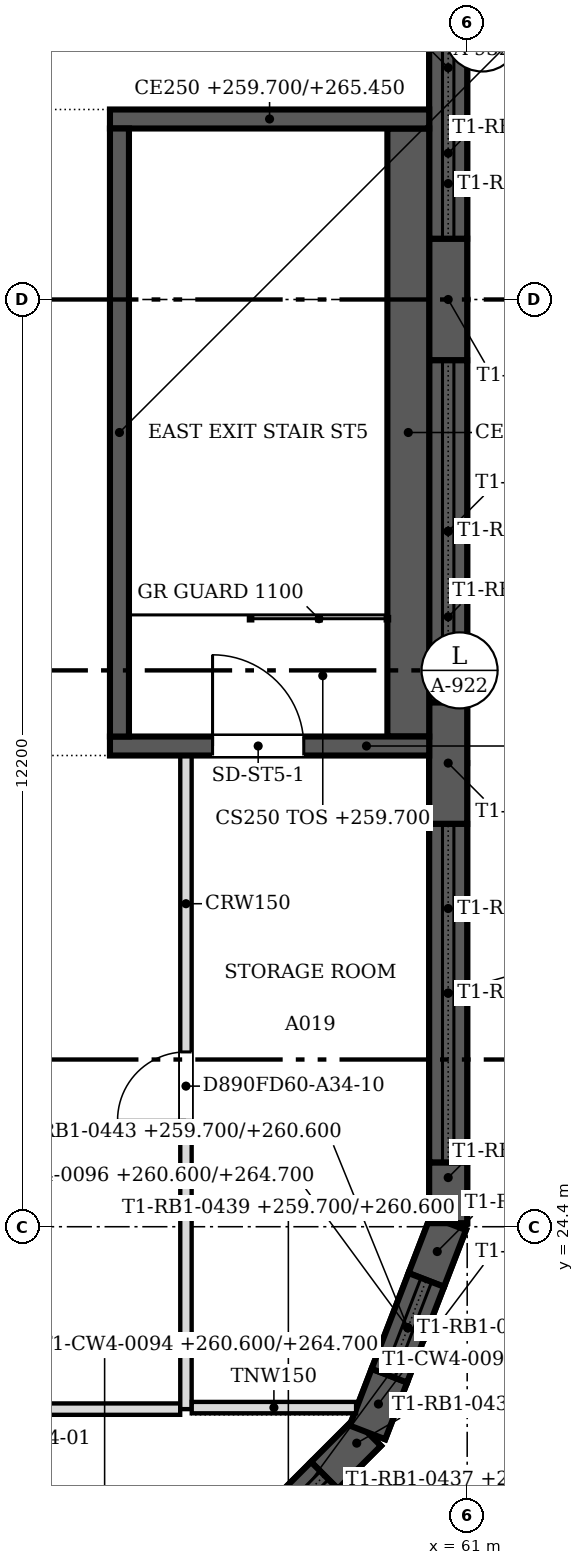
"""IFC4 building model, lengths in metres.
Left out: names, types, materials, properties, quantities, classifications, styles, units other than length and angle.
Written with IfcOpenShell. Run it as: python <this file> out.ifc"""

import sys

from ifc_helpers import new_model, si_unit, direction, frame, frame_2d, origin, place, context, subcontext, project, spatial, polyline, rectangle, outline, extrude, faceted_brep, source, transform, mapped, element, fill, save


model = new_model("IFC4")
c1 = context("Model", 3, precision=1e-05, world=origin(), true_north=direction((0.0, 1.0)))
c2 = subcontext(c1, "Body", "Model", "MODEL_VIEW")
j1 = project(units=[si_unit("LENGTHUNIT", "METRE"), si_unit("PLANEANGLEUNIT", "RADIAN")], contexts=[c1])
p1 = place(None, origin())
s1 = spatial("IfcSite", under=j1, at=p1, CompositionType="ELEMENT")
p2 = place(p1, origin())
s2 = spatial("IfcBuilding", under=s1, at=p2, CompositionType="ELEMENT")
p3 = place(p2, frame((0.0, 0.0, 259.7)))
s3 = spatial("IfcBuildingStorey", under=s2, at=p3, CompositionType="ELEMENT", Elevation=259.7)
m1 = source(origin(), c2, "Body", "Brep", [
    faceted_brep([(0.0, -0.25, 0.0), (0.8, -0.25, 0.0), (0.8, -0.25, 5.0), (0.0, -0.25, 5.0), (0.0, 0.25, 5.0), (0.747, 0.25, 5.0), (0.747, 0.25, 0.0), (0.0, 0.25, 0.0), (0.8, -0.0, 0.0), (0.8, -0.0, 5.0)], [[[0, 1, 2, 3]], [[4, 5, 6, 7]], [[7, 6, 8, 1, 0]], [[9, 2, 1, 8]], [[5, 4, 3, 2, 9]], [[4, 7, 0, 3]], [[8, 6, 5, 9]]]),
])
p4 = place(p3, frame((59.122, 21.128, 0.0), z_axis=(0.0, 0.0, 1.0), x_axis=(0.707106781187, 0.707106781187, 0.0)))
e1 = element("IfcWall", 1, at=p4, inside=s3, PredefinedType="SOLIDWALL", context=c2, shape_type="MappedRepresentation", body=[
    mapped(m1, transform((0.0, 0.0, 0.0), scale=1.0)),
])
m2 = source(origin(), c2, "Body", "SweptSolid", [
    extrude(outline(polyline([(0.0, 0.0), (1.344, 0.0), (1.344, 0.9), (0.0, 0.9), (0.0, 0.0)])), frame((0.0, 0.25, 0.0), z_axis=(0.0, -1.0, 0.0), x_axis=(1.0, 0.0, 0.0)), (0.0, 0.0, 1.0), 0.5),
])
p5 = place(p3, frame((58.172, 20.177, 0.0), z_axis=(0.0, 0.0, 1.0), x_axis=(0.707106781187, 0.707106781187, 0.0)))
e2 = element("IfcWall", 2, at=p5, inside=s3, PredefinedType="SOLIDWALL", context=c2, shape_type="MappedRepresentation", body=[
    mapped(m2, transform((0.0, 0.0, 0.0), scale=1.0)),
])
m3 = source(origin(), c2, "Body", "Brep", [
    faceted_brep([(0.0, -0.25, 0.0), (2.944, -0.25, 0.0), (2.944, -0.25, 1.0), (0.0, -0.25, 1.0), (0.053, 0.25, 1.0), (2.891, 0.25, 1.0), (2.891, 0.25, 0.0), (0.053, 0.25, 0.0), (2.944, 0.0, 0.0), (0.0, 0.0, 0.0), (2.944, 0.0, 1.0), (0.0, 0.0, 1.0)], [[[0, 1, 2, 3]], [[4, 5, 6, 7]], [[7, 6, 8, 1, 0, 9]], [[10, 2, 1, 8]], [[5, 4, 11, 3, 2, 10]], [[9, 0, 3, 11]], [[7, 9, 11, 4]], [[8, 6, 5, 10]]]),
])
p6 = place(p3, frame((57.606, 19.612, 5.0), z_axis=(0.0, 0.0, 1.0), x_axis=(0.707106781187, 0.707106781187, 0.0)))
e3 = element("IfcWall", 3, at=p6, inside=s3, PredefinedType="SOLIDWALL", context=c2, shape_type="MappedRepresentation", body=[
    mapped(m3, transform((0.0, 0.0, 0.0), scale=1.0)),
])
m4 = source(origin(), c2, "Body", "Brep", [
    faceted_brep([(0.0, -0.25, 0.0), (0.8, -0.25, 0.0), (0.8, -0.25, 5.0), (0.0, -0.25, 5.0), (0.053, 0.25, 5.0), (0.8, 0.25, 5.0), (0.8, 0.25, 0.0), (0.053, 0.25, 0.0), (0.0, 0.0, 0.0), (0.0, 0.0, 5.0)], [[[0, 1, 2, 3]], [[4, 5, 6, 7]], [[7, 6, 1, 0, 8]], [[5, 4, 9, 3, 2]], [[8, 0, 3, 9]], [[7, 8, 9, 4]], [[1, 6, 5, 2]]]),
])
p7 = place(p3, frame((59.688, 21.694, 0.0), z_axis=(0.0, 0.0, 1.0), x_axis=(0.360103552367, 0.932912338632, 0.0)))
e4 = element("IfcWall", 4, at=p7, inside=s3, PredefinedType="SOLIDWALL", context=c2, shape_type="MappedRepresentation", body=[
    mapped(m4, transform((0.0, 0.0, 0.0), scale=1.0)),
])
m5 = source(origin(), c2, "Body", "Brep", [
    faceted_brep([(0.0, -0.25, 0.0), (0.8, -0.25, 0.0), (0.8, -0.25, 5.0), (0.0, -0.25, 5.0), (0.0, 0.25, 5.0), (0.753, 0.25, 5.0), (0.753, 0.25, 0.0), (0.0, 0.25, 0.0), (0.8, -0.0, 0.0), (0.8, -0.0, 5.0)], [[[0, 1, 2, 3]], [[4, 5, 6, 7]], [[7, 6, 8, 1, 0]], [[9, 2, 1, 8]], [[5, 4, 3, 2, 9]], [[4, 7, 0, 3]], [[8, 6, 5, 9]]]),
])
p8 = place(p3, frame((60.462, 23.7, 0.0), z_axis=(0.0, 0.0, 1.0), x_axis=(0.3598379092, 0.93301483327, 0.0)))
e5 = element("IfcWall", 5, at=p8, inside=s3, PredefinedType="SOLIDWALL", context=c2, shape_type="MappedRepresentation", body=[
    mapped(m5, transform((0.0, 0.0, 0.0), scale=1.0)),
])
m6 = source(origin(), c2, "Body", "SweptSolid", [
    extrude(outline(polyline([(0.0, 0.0), (1.351, 0.0), (1.351, 0.9), (0.0, 0.9), (0.0, 0.0)])), frame((0.0, 0.25, 0.0), z_axis=(0.0, -1.0, 0.0), x_axis=(1.0, 0.0, 0.0)), (0.0, 0.0, 1.0), 0.5),
])
p9 = place(p3, frame((59.976, 22.44, 0.0), z_axis=(0.0, 0.0, 1.0), x_axis=(0.359923772835, 0.932981713512, 0.0)))
e6 = element("IfcWall", 6, at=p9, inside=s3, PredefinedType="SOLIDWALL", context=c2, shape_type="MappedRepresentation", body=[
    mapped(m6, transform((0.0, 0.0, 0.0), scale=1.0)),
])
m7 = source(origin(), c2, "Body", "Brep", [
    faceted_brep([(0.0, -0.25, 0.0), (2.95, -0.25, 0.0), (2.95, -0.25, 1.0), (0.0, -0.25, 1.0), (0.053, 0.25, 1.0), (2.904, 0.25, 1.0), (2.904, 0.25, 0.0), (0.053, 0.25, 0.0), (2.95, 0.0, 0.0), (0.0, 0.0, 0.0), (2.95, 0.0, 1.0), (0.0, 0.0, 1.0)], [[[0, 1, 2, 3]], [[4, 5, 6, 7]], [[7, 6, 8, 1, 0, 9]], [[10, 2, 1, 8]], [[5, 4, 11, 3, 2, 10]], [[9, 0, 3, 11]], [[7, 9, 11, 4]], [[8, 6, 5, 10]]]),
])
p10 = place(p3, frame((59.688, 21.694, 5.0), z_axis=(0.0, 0.0, 1.0), x_axis=(0.359949242603, 0.932971887438, 0.0)))
e7 = element("IfcWall", 7, at=p10, inside=s3, PredefinedType="SOLIDWALL", context=c2, shape_type="MappedRepresentation", body=[
    mapped(m7, transform((0.0, 0.0, 0.0), scale=1.0)),
])
m8 = source(origin(), c2, "Body", "Brep", [
    faceted_brep([(0.0, -0.25, 0.0), (0.8, -0.25, 0.0), (0.8, -0.25, 5.0), (0.0, -0.25, 5.0), (0.047, 0.25, 5.0), (0.8, 0.25, 5.0), (0.8, 0.25, 0.0), (0.047, 0.25, 0.0), (0.0, 0.0, 0.0), (0.0, 0.0, 5.0)], [[[0, 1, 2, 3]], [[4, 5, 6, 7]], [[7, 6, 1, 0, 8]], [[5, 4, 9, 3, 2]], [[8, 0, 3, 9]], [[7, 8, 9, 4]], [[1, 6, 5, 2]]]),
])
p11 = place(p3, frame((60.75, 24.447, 0.0), z_axis=(0.0, 0.0, 1.0), x_axis=(0.0, 1.0, 0.0)))
e8 = element("IfcWall", 8, at=p11, inside=s3, PredefinedType="SOLIDWALL", context=c2, shape_type="MappedRepresentation", body=[
    mapped(m8, transform((0.0, 0.0, 0.0), scale=1.0)),
])
m9 = source(origin(), c2, "Body", "SweptSolid", [
    extrude(outline(polyline([(0.0, 0.0), (1.6, 0.0), (1.6, 5.0), (0.0, 5.0), (0.0, 0.0)])), frame((0.0, 0.25, 0.0), z_axis=(0.0, -1.0, 0.0), x_axis=(1.0, 0.0, 0.0)), (0.0, 0.0, 1.0), 0.5),
])
p12 = place(p3, frame((60.75, 29.7, 0.0), z_axis=(0.0, 0.0, 1.0), x_axis=(0.0, 1.0, 0.0)))
e9 = element("IfcWall", 9, at=p12, inside=s3, PredefinedType="SOLIDWALL", context=c2, shape_type="MappedRepresentation", body=[
    mapped(m9, transform((0.0, 0.0, 0.0), scale=1.0)),
])
m10 = source(origin(), c2, "Body", "Brep", [
    faceted_brep([(0.0, -0.25, 0.0), (1.6, -0.25, 0.0), (1.6, -0.25, 5.0), (0.0, -0.25, 5.0), (0.0, 0.25, 5.0), (1.6, 0.25, 5.0), (1.6, 0.25, 0.0), (0.0, 0.25, 0.0)], [[[0, 1, 2, 3]], [[4, 5, 6, 7]], [[7, 6, 1, 0]], [[5, 4, 3, 2]], [[4, 7, 0, 3]], [[1, 6, 5, 2]]]),
])
p13 = place(p3, frame((60.75, 35.8, 0.0), z_axis=(0.0, 0.0, 1.0), x_axis=(0.0, 1.0, 0.0)))
e10 = element("IfcWall", 10, at=p13, inside=s3, PredefinedType="SOLIDWALL", context=c2, shape_type="MappedRepresentation", body=[
    mapped(m10, transform((0.0, 0.0, 0.0), scale=1.0)),
])
m11 = source(origin(), c2, "Body", "SweptSolid", [
    extrude(outline(polyline([(0.0, 0.0), (4.453, 0.0), (4.453, 0.9), (0.0, 0.9), (0.0, 0.0)])), frame((0.0, 0.25, 0.0), z_axis=(0.0, -1.0, 0.0), x_axis=(1.0, 0.0, 0.0)), (0.0, 0.0, 1.0), 0.5),
])
p14 = place(p3, frame((60.75, 25.247, 0.0), z_axis=(0.0, 0.0, 1.0), x_axis=(0.0, 1.0, 0.0)))
e11 = element("IfcWall", 11, at=p14, inside=s3, PredefinedType="SOLIDWALL", context=c2, shape_type="MappedRepresentation", body=[
    mapped(m11, transform((0.0, 0.0, 0.0), scale=1.0)),
])
m12 = source(origin(), c2, "Body", "Brep", [
    faceted_brep([(0.0, -0.25, 0.0), (6.053, -0.25, 0.0), (6.053, -0.25, 1.0), (0.0, -0.25, 1.0), (0.047, 0.25, 1.0), (6.053, 0.25, 1.0), (6.053, 0.25, 0.0), (0.047, 0.25, 0.0), (0.0, 0.0, 0.0), (0.0, 0.0, 1.0)], [[[0, 1, 2, 3]], [[4, 5, 6, 7]], [[7, 6, 1, 0, 8]], [[5, 4, 9, 3, 2]], [[8, 0, 3, 9]], [[7, 8, 9, 4]], [[1, 6, 5, 2]]]),
])
p15 = place(p3, frame((60.75, 24.447, 5.0), z_axis=(0.0, 0.0, 1.0), x_axis=(0.0, 1.0, 0.0)))
e12 = element("IfcWall", 12, at=p15, inside=s3, PredefinedType="SOLIDWALL", context=c2, shape_type="MappedRepresentation", body=[
    mapped(m12, transform((0.0, 0.0, 0.0), scale=1.0)),
])
m13 = source(origin(), c2, "Body", "SweptSolid", [
    extrude(outline(polyline([(0.0, 0.0), (4.5, 0.0), (4.5, 0.9), (0.0, 0.9), (0.0, 0.0)])), frame((0.0, 0.25, 0.0), z_axis=(0.0, -1.0, 0.0), x_axis=(1.0, 0.0, 0.0)), (0.0, 0.0, 1.0), 0.5),
])
p16 = place(p3, frame((60.75, 31.3, 0.0), z_axis=(0.0, 0.0, 1.0), x_axis=(0.0, 1.0, 0.0)))
e13 = element("IfcWall", 13, at=p16, inside=s3, PredefinedType="SOLIDWALL", context=c2, shape_type="MappedRepresentation", body=[
    mapped(m13, transform((0.0, 0.0, 0.0), scale=1.0)),
])
m14 = source(origin(), c2, "Body", "SweptSolid", [
    extrude(outline(polyline([(0.0, 0.0), (6.1, 0.0), (6.1, 1.0), (0.0, 1.0), (0.0, 0.0)])), frame((0.0, 0.25, 0.0), z_axis=(0.0, -1.0, 0.0), x_axis=(1.0, 0.0, 0.0)), (0.0, 0.0, 1.0), 0.5),
])
p17 = place(p3, frame((60.75, 30.5, 5.0), z_axis=(0.0, 0.0, 1.0), x_axis=(0.0, 1.0, 0.0)))
e14 = element("IfcWall", 14, at=p17, inside=s3, PredefinedType="SOLIDWALL", context=c2, shape_type="MappedRepresentation", body=[
    mapped(m14, transform((0.0, 0.0, 0.0), scale=1.0)),
])
p18 = place(p3, frame((60.75, 37.4, 0.0), z_axis=(0.0, 0.0, 1.0), x_axis=(0.0, 1.0, 0.0)))
e15 = element("IfcWall", 15, at=p18, inside=s3, PredefinedType="SOLIDWALL", context=c2, shape_type="MappedRepresentation", body=[
    mapped(m13, transform((0.0, 0.0, 0.0), scale=1.0)),
])
m15 = source(origin(), c2, "Body", "Brep", [
    faceted_brep([(0.0, -0.25, 0.0), (6.1, -0.25, 0.0), (6.1, -0.25, 1.0), (0.0, -0.25, 1.0), (0.0, 0.25, 1.0), (6.1, 0.25, 1.0), (6.1, 0.25, 0.0), (0.0, 0.25, 0.0)], [[[0, 1, 2, 3]], [[4, 5, 6, 7]], [[7, 6, 1, 0]], [[5, 4, 3, 2]], [[4, 7, 0, 3]], [[1, 6, 5, 2]]]),
])
p19 = place(p3, frame((60.75, 36.6, 5.0), z_axis=(0.0, 0.0, 1.0), x_axis=(0.0, 1.0, 0.0)))
e16 = element("IfcWall", 16, at=p19, inside=s3, PredefinedType="SOLIDWALL", context=c2, shape_type="MappedRepresentation", body=[
    mapped(m15, transform((0.0, 0.0, 0.0), scale=1.0)),
])
p20 = place(p3, frame((60.5, 30.725, 0.0), z_axis=(0.0, 0.0, 1.0), x_axis=(-1.0, 0.0, 0.0)))
e17 = element("IfcWall", 17, at=p20, inside=s3, PredefinedType="SOLIDWALL", context=c2, shape_type="SweptSolid", body=[
    extrude(rectangle(XDim=4.2, YDim=0.25, at=frame_2d((2.1, 0.0))), origin(), (0.0, 0.0, 1.0), 5.75),
])
m16 = source(origin(), c2, "Body", "SweptSolid", [
    extrude(rectangle(XDim=1.2, YDim=2.1, at=frame_2d((0.6, 1.05))), frame((0.0, 0.135, 0.0), z_axis=(0.0, -1.0, 0.0), x_axis=(1.0, 0.0, 0.0)), (0.0, 0.0, 1.0), 0.27),
])
p21 = place(p20, frame((1.65, 0.0, 0.0)))
e18 = element("IfcOpeningElement", 18, at=p21, cuts=e17, PredefinedType="OPENING", context=c2, shape_type="MappedRepresentation", body=[
    mapped(m16, transform((0.0, 0.0, 0.0), scale=1.0)),
])
p22 = place(p3, frame((56.425, 30.85, 0.0), z_axis=(0.0, 0.0, 1.0), x_axis=(0.0, 1.0, 0.0)))
e19 = element("IfcWall", 19, at=p22, inside=s3, PredefinedType="SOLIDWALL", context=c2, shape_type="SweptSolid", body=[
    extrude(rectangle(XDim=8.0, YDim=0.25, at=frame_2d((4.0, 0.0))), origin(), (0.0, 0.0, 1.0), 5.75),
])
p23 = place(p3, frame((56.3, 38.975, 0.0), z_axis=(0.0, 0.0, 1.0), x_axis=(1.0, 0.0, 0.0)))
e20 = element("IfcWall", 20, at=p23, inside=s3, PredefinedType="SOLIDWALL", context=c2, shape_type="SweptSolid", body=[
    extrude(rectangle(XDim=4.2, YDim=0.25, at=frame_2d((2.1, 0.0))), origin(), (0.0, 0.0, 1.0), 5.75),
])
p24 = place(p3, frame((60.225, 38.85, 0.0), z_axis=(0.0, 0.0, 1.0), x_axis=(0.0, -1.0, 0.0)))
e21 = element("IfcWall", 21, at=p24, inside=s3, PredefinedType="SOLIDWALL", context=c2, shape_type="SweptSolid", body=[
    extrude(rectangle(XDim=8.0, YDim=0.55, at=frame_2d((4.0, 0.0))), origin(), (0.0, 0.0, 1.0), 5.75),
])
p25 = place(p3, frame((57.224, 22.0, 0.0), z_axis=(0.0, 0.0, 1.0), x_axis=(-1.0, 0.0, 0.0)))
e22 = element("IfcWall", 22, at=p25, inside=s3, PredefinedType="PARTITIONING", context=c2, shape_type="SweptSolid", body=[
    extrude(rectangle(XDim=29.048, YDim=0.15, at=frame_2d((14.524, 0.0))), origin(), (0.0, 0.0, 1.0), 5.167),
])
m17 = source(origin(), c2, "Body", "SweptSolid", [
    extrude(rectangle(XDim=0.9, YDim=2.1, at=frame_2d((0.45, 1.05))), frame((0.0, 0.085, 0.0), z_axis=(0.0, -1.0, 0.0), x_axis=(1.0, 0.0, 0.0)), (0.0, 0.0, 1.0), 0.17),
])
p26 = place(p25, frame((1.923, 0.0, 0.0)))
e23 = element("IfcOpeningElement", 23, at=p26, cuts=e22, PredefinedType="OPENING", context=c2, shape_type="MappedRepresentation", body=[
    mapped(m17, transform((0.0, 0.0, 0.0), scale=1.0)),
])
p27 = place(p25, frame((25.548, 0.0, 0.0)))
e24 = element("IfcOpeningElement", 24, at=p27, cuts=e22, PredefinedType="OPENING", context=c2, shape_type="MappedRepresentation", body=[
    mapped(m17, transform((0.0, 0.0, 0.0), scale=1.0)),
])
p28 = place(p25, frame((19.523, 0.0, 0.0)))
e25 = element("IfcOpeningElement", 25, at=p28, cuts=e22, PredefinedType="OPENING", context=c2, shape_type="MappedRepresentation", body=[
    mapped(m17, transform((0.0, 0.0, 0.0), scale=1.0)),
])
p29 = place(p25, frame((7.323, 0.0, 0.0)))
e26 = element("IfcOpeningElement", 26, at=p29, cuts=e22, PredefinedType="OPENING", context=c2, shape_type="MappedRepresentation", body=[
    mapped(m17, transform((0.0, 0.0, 0.0), scale=1.0)),
])
p30 = place(p25, frame((13.424, 0.0, 0.0)))
e27 = element("IfcOpeningElement", 27, at=p30, cuts=e22, PredefinedType="OPENING", context=c2, shape_type="MappedRepresentation", body=[
    mapped(m17, transform((0.0, 0.0, 0.0), scale=1.0)),
])
p31 = place(p3, frame((57.3, 30.6, 0.0), z_axis=(0.0, 0.0, 1.0), x_axis=(0.0, -1.0, 0.0)))
e28 = element("IfcWall", 28, at=p31, inside=s3, PredefinedType="PARTITIONING", context=c2, shape_type="SweptSolid", body=[
    extrude(rectangle(XDim=8.6, YDim=0.15, at=frame_2d((4.3, 0.0))), origin(), (0.0, 0.0, 1.0), 5.167),
])
p32 = place(p31, frame((3.9, 0.0, 0.0)))
e29 = element("IfcOpeningElement", 29, at=p32, cuts=e28, PredefinedType="OPENING", context=c2, shape_type="MappedRepresentation", body=[
    mapped(m17, transform((0.0, 0.0, 0.0), scale=1.0)),
])
p33 = place(p3, frame((57.376, 22.02, 0.0), z_axis=(0.0, 0.0, 1.0), x_axis=(1.0, 0.0, 0.0)))
e30 = element("IfcWall", 30, at=p33, inside=s3, PredefinedType="PARTITIONING", context=c2, shape_type="SweptSolid", body=[
    extrude(rectangle(XDim=2.162, YDim=0.15, at=frame_2d((1.081, 0.0))), origin(), (0.0, 0.0, 1.0), 5.167),
])
m18 = source(origin(), c2, "Body", "SweptSolid", [
    extrude(rectangle(XDim=1.2, YDim=2.1, at=frame_2d((0.6, 1.05))), frame((0.0, 0.025, 0.0), z_axis=(0.0, -1.0, 0.0), x_axis=(1.0, 0.0, 0.0)), (0.0, 0.0, 1.0), 0.05),
])
p34 = place(p21, origin())
e31 = element("IfcDoor", 31, at=p34, inside=s3, OperationType="SINGLE_SWING_RIGHT", PredefinedType="DOOR", context=c2, shape_type="MappedRepresentation", body=[
    mapped(m18, transform((0.0, 0.0, 0.0), scale=1.0)),
])
fill(e18, e31)
m19 = source(origin(), c2, "Body", "SweptSolid", [
    extrude(rectangle(XDim=0.9, YDim=2.1, at=frame_2d((0.45, 1.05))), frame((0.0, 0.025, 0.0), z_axis=(0.0, -1.0, 0.0), x_axis=(1.0, 0.0, 0.0)), (0.0, 0.0, 1.0), 0.05),
])
p35 = place(p32, origin())
e32 = element("IfcDoor", 32, at=p35, inside=s3, OperationType="SINGLE_SWING_RIGHT", PredefinedType="DOOR", context=c2, shape_type="MappedRepresentation", body=[
    mapped(m19, transform((0.0, 0.0, 0.0), scale=1.0)),
])
fill(e29, e32)
save(model, sys.argv[1])
